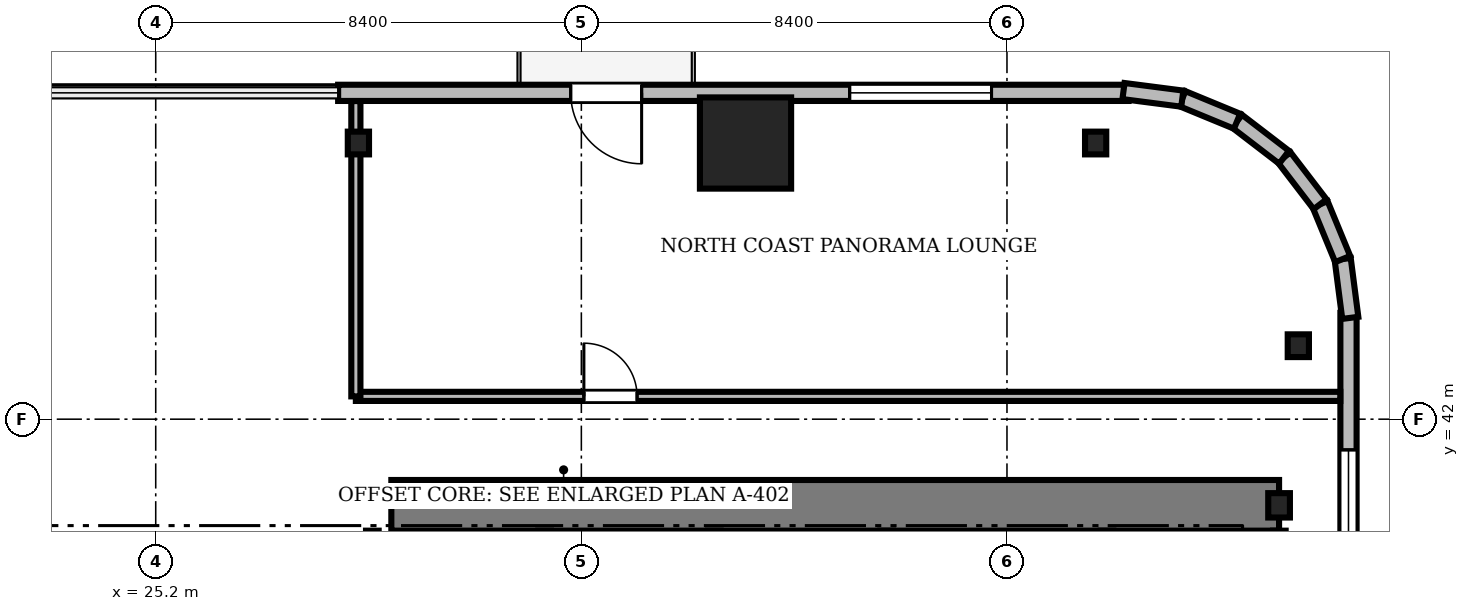
"""IFC4 building model, lengths in metres.
Left out: names, types, materials, properties, quantities, classifications, styles, units other than length and angle.
Written with IfcOpenShell. Run it as: python <this file> out.ifc"""

import sys

from ifc_helpers import new_model, si_unit, direction, frame, frame_2d, origin, origin_2d, place, context, subcontext, project, spatial, rectangle, i_section, extrude, source, transform, mapped, element, fill, save


model = new_model("IFC4")
c1 = context("Model", 3, precision=1e-05, world=origin(), true_north=direction((0.0, 1.0)))
c2 = subcontext(c1, "Body", "Model", "MODEL_VIEW")
j1 = project(units=[si_unit("LENGTHUNIT", "METRE"), si_unit("PLANEANGLEUNIT", "RADIAN")], contexts=[c1])
p1 = place(None, origin())
s1 = spatial("IfcSite", under=j1, at=p1, CompositionType="ELEMENT")
p2 = place(p1, origin())
s2 = spatial("IfcBuilding", under=s1, at=p2, CompositionType="ELEMENT")
p3 = place(p2, frame((0.0, 0.0, 34.9)))
s3 = spatial("IfcBuildingStorey", under=s2, at=p3, CompositionType="ELEMENT", Elevation=34.9)
m1 = source(origin(), c2, "Body", "SweptSolid", [
    extrude(rectangle(XDim=17.52, YDim=1.0, at=frame_2d((8.76, 0.0))), origin(), (0.0, 0.0, 1.0), 3.41),
])
p4 = place(p3, frame((29.85, 40.3, 0.0), z_axis=(0.0, 0.0, 1.0), x_axis=(1.0, 0.0, 0.0)))
e1 = element("IfcWall", 1, at=p4, inside=s3, PredefinedType="SHEAR", context=c2, shape_type="MappedRepresentation", body=[
    mapped(m1, transform((0.0, 0.0, 0.0), scale=1.0)),
])
m2 = source(origin(), c2, "Body", "SweptSolid", [
    extrude(i_section(OverallWidth=0.428, OverallDepth=0.481, WebThickness=0.04, FlangeThickness=0.063, FilletRadius=0.015, at=origin_2d()), origin(), (0.0, 0.0, 1.0), 3.41),
])
p5 = place(p3, frame((47.37, 40.3, 0.0), z_axis=(0.0, 0.0, 1.0), x_axis=(1.0, 0.0, 0.0)))
e2 = element("IfcColumn", 2, at=p5, inside=s3, PredefinedType="COLUMN", context=c2, shape_type="MappedRepresentation", body=[
    mapped(m2, transform((0.0, 0.0, 0.0), scale=1.0)),
])
m3 = source(origin(), c2, "Body", "SweptSolid", [
    extrude(rectangle(XDim=1.8, YDim=1.8, at=origin_2d()), origin(), (0.0, 0.0, 1.0), 3.41),
])
p6 = place(p3, frame((36.84, 47.45, 0.0), z_axis=(0.0, 0.0, 1.0), x_axis=(1.0, 0.0, 0.0)))
e3 = element("IfcColumn", 3, at=p6, inside=s3, PredefinedType="COLUMN", context=c2, shape_type="MappedRepresentation", body=[
    mapped(m3, transform((0.0, 0.0, 0.0), scale=1.0)),
])
m4 = source(origin(), c2, "Body", "SweptSolid", [
    extrude(i_section(OverallWidth=0.419, OverallDepth=0.449, WebThickness=0.031, FlangeThickness=0.048, FilletRadius=0.015, at=origin_2d()), origin(), (0.0, 0.0, 1.0), 3.41),
])
for number, where, z_axis, x_axis in (
    (4, (47.75, 43.45, 0.0), (0.0, 0.0, 1.0), (1.0, 0.0, 0.0)),
    (5, (43.75, 47.45, 0.0), (0.0, 0.0, 1.0), (1.0, 0.0, 0.0)),
    (6, (29.2, 47.45, 0.0), (0.0, 0.0, 1.0), (1.0, 0.0, 0.0)),
):
    element("IfcColumn", number, at=place(p3, frame(where, z_axis=z_axis, x_axis=x_axis)), inside=s3, PredefinedType="COLUMN", context=c2, shape_type="MappedRepresentation", body=[
        mapped(m4, transform((0.0, 0.0, 0.0), scale=1.0)),
    ])
m5 = source(origin(), c2, "Body", "SweptSolid", [
    extrude(rectangle(XDim=15.6, YDim=0.32, at=frame_2d((7.8, 0.0))), origin(), (0.0, 0.0, 1.0), 3.41),
])
p7 = place(p3, frame((44.4, 48.44, 0.0), z_axis=(0.0, 0.0, 1.0), x_axis=(-1.0, 0.0, 0.0)))
e7 = element("IfcWall", 7, at=p7, inside=s3, PredefinedType="SOLIDWALL", context=c2, shape_type="MappedRepresentation", body=[
    mapped(m5, transform((0.0, 0.0, 0.0), scale=1.0)),
])
m6 = source(origin(), c2, "Body", "SweptSolid", [
    extrude(rectangle(XDim=1.4, YDim=2.3, at=frame_2d((0.7, 1.15))), frame((0.0, 0.17, 0.0), z_axis=(0.0, -1.0, 0.0), x_axis=(1.0, 0.0, 0.0)), (0.0, 0.0, 1.0), 0.34),
])
p8 = place(p7, frame((9.61, 0.0, 0.0)))
e8 = element("IfcOpeningElement", 8, at=p8, cuts=e7, PredefinedType="OPENING", context=c2, shape_type="MappedRepresentation", body=[
    mapped(m6, transform((0.0, 0.0, 0.0), scale=1.0)),
])
m7 = source(origin(), c2, "Body", "SweptSolid", [
    extrude(rectangle(XDim=2.8, YDim=2.4, at=frame_2d((1.4, 1.2))), frame((0.0, 0.17, 0.0), z_axis=(0.0, -1.0, 0.0), x_axis=(1.0, 0.0, 0.0)), (0.0, 0.0, 1.0), 0.34),
])
p9 = place(p7, frame((2.705, 0.0, 0.72)))
e9 = element("IfcOpeningElement", 9, at=p9, cuts=e7, PredefinedType="OPENING", context=c2, shape_type="MappedRepresentation", body=[
    mapped(m7, transform((0.0, 0.0, 0.0), scale=1.0)),
])
m8 = source(origin(), c2, "Body", "SweptSolid", [
    extrude(rectangle(XDim=15.6, YDim=0.32, at=frame_2d((7.8, 0.0))), origin(), (0.0, 0.0, 1.0), 3.41),
])
p10 = place(p3, frame((48.74, 28.5, 0.0), z_axis=(0.0, 0.0, 1.0), x_axis=(0.0, 1.0, 0.0)))
e10 = element("IfcWall", 10, at=p10, inside=s3, PredefinedType="SOLIDWALL", context=c2, shape_type="MappedRepresentation", body=[
    mapped(m8, transform((0.0, 0.0, 0.0), scale=1.0)),
])
p11 = place(p10, frame((10.095, 0.0, 0.72)))
e11 = element("IfcOpeningElement", 11, at=p11, cuts=e10, PredefinedType="OPENING", context=c2, shape_type="MappedRepresentation", body=[
    mapped(m7, transform((0.0, 0.0, 0.0), scale=1.0)),
])
m9 = source(origin(), c2, "Body", "SweptSolid", [
    extrude(rectangle(XDim=1.17, YDim=0.32, at=frame_2d((0.585, 0.0))), origin(), (0.0, 0.0, 1.0), 3.41),
])
p12 = place(p3, frame((48.776, 44.0, 0.0), z_axis=(0.0, 0.0, 1.0), x_axis=(-0.128295670475, 0.991735963317, 0.0)))
e12 = element("IfcWall", 12, at=p12, inside=s3, PredefinedType="SOLIDWALL", context=c2, shape_type="MappedRepresentation", body=[
    mapped(m9, transform((0.0, 0.0, 0.0), scale=1.0)),
])
m10 = source(origin(), c2, "Body", "SweptSolid", [
    extrude(rectangle(XDim=1.169, YDim=0.32, at=frame_2d((0.584, 0.0))), origin(), (0.0, 0.0, 1.0), 3.41),
])
p13 = place(p3, frame((48.625, 45.16, 0.0), z_axis=(0.0, 0.0, 1.0), x_axis=(-0.381054331552, 0.924552646638, 0.0)))
e13 = element("IfcWall", 13, at=p13, inside=s3, PredefinedType="SOLIDWALL", context=c2, shape_type="MappedRepresentation", body=[
    mapped(m10, transform((0.0, 0.0, 0.0), scale=1.0)),
])
m11 = source(origin(), c2, "Body", "SweptSolid", [
    extrude(rectangle(XDim=1.169, YDim=0.32, at=frame_2d((0.584, 0.0))), origin(), (0.0, 0.0, 1.0), 3.41),
])
p14 = place(p3, frame((48.18, 46.241, 0.0), z_axis=(0.0, 0.0, 1.0), x_axis=(-0.608387696831, 0.793639975269, 0.0)))
e14 = element("IfcWall", 14, at=p14, inside=s3, PredefinedType="SOLIDWALL", context=c2, shape_type="MappedRepresentation", body=[
    mapped(m11, transform((0.0, 0.0, 0.0), scale=1.0)),
])
m12 = source(origin(), c2, "Body", "SweptSolid", [
    extrude(rectangle(XDim=1.169, YDim=0.32, at=frame_2d((0.584, 0.0))), origin(), (0.0, 0.0, 1.0), 3.41),
])
p15 = place(p3, frame((47.469, 47.169, 0.0), z_axis=(0.0, 0.0, 1.0), x_axis=(-0.793663520347, 0.608356981114, 0.0)))
e15 = element("IfcWall", 15, at=p15, inside=s3, PredefinedType="SOLIDWALL", context=c2, shape_type="MappedRepresentation", body=[
    mapped(m12, transform((0.0, 0.0, 0.0), scale=1.0)),
])
p16 = place(p3, frame((46.541, 47.88, 0.0), z_axis=(0.0, 0.0, 1.0), x_axis=(-0.924552646638, 0.381054331552, 0.0)))
e16 = element("IfcWall", 16, at=p16, inside=s3, PredefinedType="SOLIDWALL", context=c2, shape_type="MappedRepresentation", body=[
    mapped(m10, transform((0.0, 0.0, 0.0), scale=1.0)),
])
p17 = place(p3, frame((45.46, 48.325, 0.0), z_axis=(0.0, 0.0, 1.0), x_axis=(-0.991735963317, 0.128295670475, 0.0)))
e17 = element("IfcWall", 17, at=p17, inside=s3, PredefinedType="SOLIDWALL", context=c2, shape_type="MappedRepresentation", body=[
    mapped(m9, transform((0.0, 0.0, 0.0), scale=1.0)),
])
m13 = source(origin(), c2, "Body", "SweptSolid", [
    extrude(rectangle(XDim=9.15, YDim=0.25, at=frame_2d((4.575, 0.0))), origin(), (0.0, 0.0, 1.0), 3.45),
])
for number, where, z_axis, x_axis in (
    (18, (29.475, 30.65, 0.0), (0.0, 0.0, 1.0), (0.0, 1.0, 0.0)),
    (19, (32.875, 30.65, 0.0), (0.0, 0.0, 1.0), (0.0, 1.0, 0.0)),
    (20, (36.225, 30.65, 0.0), (0.0, 0.0, 1.0), (0.0, 1.0, 0.0)),
    (21, (39.625, 30.65, 0.0), (0.0, 0.0, 1.0), (0.0, 1.0, 0.0)),
    (22, (43.975, 30.65, 0.0), (0.0, 0.0, 1.0), (0.0, 1.0, 0.0)),
    (23, (47.375, 30.65, 0.0), (0.0, 0.0, 1.0), (0.0, 1.0, 0.0)),
):
    element("IfcWall", number, at=place(p3, frame(where, z_axis=z_axis, x_axis=x_axis)), inside=s3, PredefinedType="SOLIDWALL", context=c2, shape_type="MappedRepresentation", body=[
        mapped(m13, transform((0.0, 0.0, 0.0), scale=1.0)),
    ])
m14 = source(origin(), c2, "Body", "SweptSolid", [
    extrude(rectangle(XDim=19.428, YDim=0.18, at=frame_2d((9.714, 0.0))), origin(), (0.0, 0.0, 1.0), 2.652),
])
p18 = place(p3, frame((29.15, 42.45, 0.0), z_axis=(0.0, 0.0, 1.0), x_axis=(1.0, 0.0, 0.0)))
e24 = element("IfcWall", 24, at=p18, inside=s3, PredefinedType="PARTITIONING", context=c2, shape_type="MappedRepresentation", body=[
    mapped(m14, transform((0.0, 0.0, 0.0), scale=1.0)),
])
m15 = source(origin(), c2, "Body", "SweptSolid", [
    extrude(rectangle(XDim=1.05, YDim=2.2, at=frame_2d((0.525, 1.1))), frame((0.0, 0.1, 0.0), z_axis=(0.0, -1.0, 0.0), x_axis=(1.0, 0.0, 0.0)), (0.0, 0.0, 1.0), 0.2),
])
p19 = place(p18, frame((4.5, 0.0, 0.0)))
e25 = element("IfcOpeningElement", 25, at=p19, cuts=e24, PredefinedType="OPENING", context=c2, shape_type="MappedRepresentation", body=[
    mapped(m15, transform((0.0, 0.0, 0.0), scale=1.0)),
])
m16 = source(origin(), c2, "Body", "SweptSolid", [
    extrude(rectangle(XDim=5.828, YDim=0.18, at=frame_2d((2.914, 0.0))), origin(), (0.0, 0.0, 1.0), 2.652),
])
p20 = place(p3, frame((29.15, 42.45, 0.0), z_axis=(0.0, 0.0, 1.0), x_axis=(0.0, 1.0, 0.0)))
e26 = element("IfcWall", 26, at=p20, inside=s3, PredefinedType="PARTITIONING", context=c2, shape_type="MappedRepresentation", body=[
    mapped(m16, transform((0.0, 0.0, 0.0), scale=1.0)),
])
m17 = source(origin(), c2, "Body", "SweptSolid", [
    extrude(rectangle(XDim=1.4, YDim=2.3, at=frame_2d((0.7, 1.15))), frame((0.0, 0.025, 0.0), z_axis=(0.0, -1.0, 0.0), x_axis=(1.0, 0.0, 0.0)), (0.0, 0.0, 1.0), 0.05),
])
p21 = place(p8, frame((1.4, 0.0, 0.0), z_axis=(0.0, 0.0, 1.0), x_axis=(-1.0, 0.0, 0.0)))
e27 = element("IfcDoor", 27, at=p21, inside=s3, OperationType="DOUBLE_DOOR_SLIDING", PredefinedType="DOOR", context=c2, shape_type="MappedRepresentation", body=[
    mapped(m17, transform((0.0, 0.0, 0.0), scale=1.0)),
])
fill(e8, e27)
m18 = source(origin(), c2, "Body", "SweptSolid", [
    extrude(rectangle(XDim=2.8, YDim=2.4, at=frame_2d((1.4, 1.2))), frame((0.0, 0.03, 0.0), z_axis=(0.0, -1.0, 0.0), x_axis=(1.0, 0.0, 0.0)), (0.0, 0.0, 1.0), 0.06),
])
p22 = place(p9, origin())
e28 = element("IfcWindow", 28, at=p22, inside=s3, PartitioningType="SINGLE_PANEL", PredefinedType="WINDOW", context=c2, shape_type="MappedRepresentation", body=[
    mapped(m18, transform((0.0, 0.0, 0.0), scale=1.0)),
])
fill(e9, e28)
p23 = place(p11, origin())
e29 = element("IfcWindow", 29, at=p23, inside=s3, PartitioningType="SINGLE_PANEL", PredefinedType="WINDOW", context=c2, shape_type="MappedRepresentation", body=[
    mapped(m18, transform((0.0, 0.0, 0.0), scale=1.0)),
])
fill(e11, e29)
m19 = source(origin(), c2, "Body", "SweptSolid", [
    extrude(rectangle(XDim=1.05, YDim=2.2, at=frame_2d((0.525, 1.1))), frame((0.0, 0.025, 0.0), z_axis=(0.0, -1.0, 0.0), x_axis=(1.0, 0.0, 0.0)), (0.0, 0.0, 1.0), 0.05),
])
p24 = place(p19, origin())
e30 = element("IfcDoor", 30, at=p24, inside=s3, OperationType="SINGLE_SWING_LEFT", PredefinedType="DOOR", context=c2, shape_type="MappedRepresentation", body=[
    mapped(m19, transform((0.0, 0.0, 0.0), scale=1.0)),
])
fill(e25, e30)
save(model, sys.argv[1])
